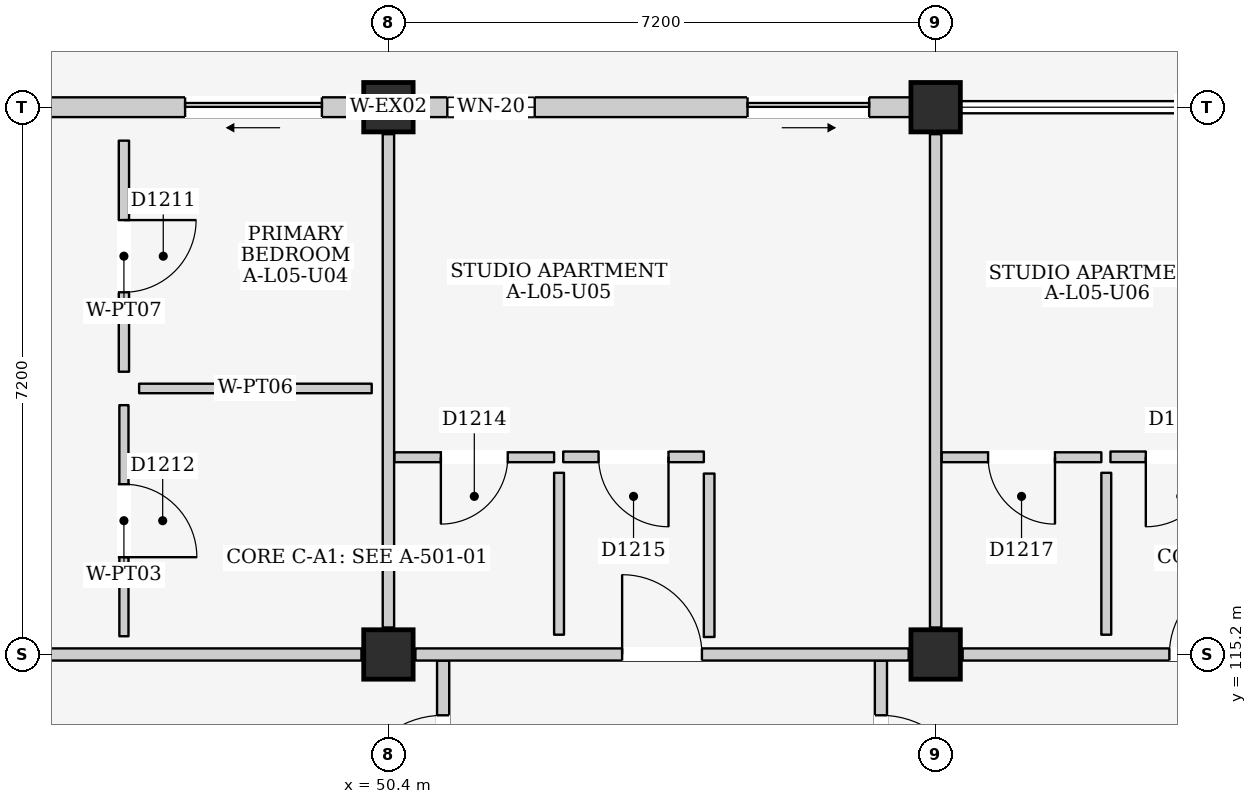
"""IFC4 building model, lengths in metres.
Left out: names, types, materials, properties, quantities, classifications, styles, units other than length and angle.
Written with IfcOpenShell. Run it as: python <this file> out.ifc"""

import sys

from ifc_helpers import new_model, si_unit, direction, frame, frame_2d, origin, origin_2d, place, context, subcontext, project, spatial, rectangle, extrude, element, fill, save


model = new_model("IFC4")
c1 = context("Model", 3, precision=1e-05, world=origin(), true_north=direction((0.0, 1.0)))
c2 = subcontext(c1, "Body", "Model", "MODEL_VIEW")
j1 = project(units=[si_unit("LENGTHUNIT", "METRE"), si_unit("PLANEANGLEUNIT", "RADIAN")], contexts=[c1])
p1 = place(None, origin())
s1 = spatial("IfcSite", under=j1, at=p1, CompositionType="ELEMENT")
p2 = place(p1, origin())
s2 = spatial("IfcBuilding", under=s1, at=p2, CompositionType="ELEMENT")
p3 = place(p2, frame((0.0, 0.0, 18.6)))
s3 = spatial("IfcBuildingStorey", under=s2, at=p3, CompositionType="ELEMENT", Elevation=18.6)
for number, where, z_axis, x_axis in (
    (1, (50.4, 115.2, 0.0), (0.0, 0.0, 1.0), (1.0, 0.0, 0.0)),
    (2, (50.4, 122.4, 0.0), (0.0, 0.0, 1.0), (1.0, 0.0, 0.0)),
    (3, (57.6, 115.2, 0.0), (0.0, 0.0, 1.0), (1.0, 0.0, 0.0)),
    (4, (57.6, 122.4, 0.0), (0.0, 0.0, 1.0), (1.0, 0.0, 0.0)),
):
    element("IfcColumn", number, at=place(p3, frame(where, z_axis=z_axis, x_axis=x_axis)), inside=s3, PredefinedType="COLUMN", context=c2, shape_type="SweptSolid", body=[
        extrude(rectangle(XDim=0.65, YDim=0.65, at=origin_2d()), origin(), (0.0, 0.0, 1.0), 3.3),
    ])
p4 = place(p3, frame((43.525, 122.4, 0.0), z_axis=(0.0, 0.0, 1.0), x_axis=(1.0, 0.0, 0.0)))
e5 = element("IfcWall", 5, at=p4, inside=s3, PredefinedType="ELEMENTEDWALL", context=c2, shape_type="SweptSolid", body=[
    extrude(rectangle(XDim=6.55, YDim=0.26, at=frame_2d((3.275, 0.0))), origin(), (0.0, 0.0, 1.0), 2.595),
])
p5 = place(p4, frame((4.2, 0.0, 0.0)))
e6 = element("IfcOpeningElement", 6, at=p5, cuts=e5, PredefinedType="OPENING", context=c2, shape_type="SweptSolid", body=[
    extrude(rectangle(XDim=1.8, YDim=2.12, at=frame_2d((0.9, 1.06))), frame((0.0, 0.145, 0.0), z_axis=(0.0, -1.0, 0.0), x_axis=(1.0, 0.0, 0.0)), (0.0, 0.0, 1.0), 0.29),
])
p6 = place(p4, frame((0.45, 0.0, 0.9)))
e7 = element("IfcOpeningElement", 7, at=p6, cuts=e5, PredefinedType="OPENING", context=c2, shape_type="SweptSolid", body=[
    extrude(rectangle(XDim=1.65, YDim=1.35, at=frame_2d((0.825, 0.675))), frame((0.0, 0.145, 0.0), z_axis=(0.0, -1.0, 0.0), x_axis=(1.0, 0.0, 0.0)), (0.0, 0.0, 1.0), 0.29),
])
p7 = place(p3, frame((50.725, 122.4, 0.0), z_axis=(0.0, 0.0, 1.0), x_axis=(1.0, 0.0, 0.0)))
e8 = element("IfcWall", 8, at=p7, inside=s3, PredefinedType="ELEMENTEDWALL", context=c2, shape_type="SweptSolid", body=[
    extrude(rectangle(XDim=6.55, YDim=0.26, at=frame_2d((3.275, 0.0))), origin(), (0.0, 0.0, 1.0), 2.595),
])
p8 = place(p7, frame((4.4, 0.0, 0.0)))
e9 = element("IfcOpeningElement", 9, at=p8, cuts=e8, PredefinedType="OPENING", context=c2, shape_type="SweptSolid", body=[
    extrude(rectangle(XDim=1.6, YDim=2.12, at=frame_2d((0.8, 1.06))), frame((0.0, 0.145, 0.0), z_axis=(0.0, -1.0, 0.0), x_axis=(1.0, 0.0, 0.0)), (0.0, 0.0, 1.0), 0.29),
])
p9 = place(p7, frame((0.45, 0.0, 0.9)))
e10 = element("IfcOpeningElement", 10, at=p9, cuts=e8, PredefinedType="OPENING", context=c2, shape_type="SweptSolid", body=[
    extrude(rectangle(XDim=1.15, YDim=1.15, at=frame_2d((0.575, 0.575))), frame((0.0, 0.145, 0.0), z_axis=(0.0, -1.0, 0.0), x_axis=(1.0, 0.0, 0.0)), (0.0, 0.0, 1.0), 0.29),
])
p10 = place(p3, frame((51.12, 111.1, 0.0), z_axis=(0.0, 0.0, 1.0), x_axis=(0.0, 1.0, 0.0)))
e11 = element("IfcWall", 11, at=p10, inside=s3, PredefinedType="PARTITIONING", context=c2, shape_type="SweptSolid", body=[
    extrude(rectangle(XDim=4.02, YDim=0.16, at=frame_2d((2.01, 0.0))), origin(), (0.0, 0.0, 1.0), 3.06),
])
p11 = place(p10, frame((2.1, 0.0, 0.0)))
e12 = element("IfcOpeningElement", 12, at=p11, cuts=e11, PredefinedType="OPENING", context=c2, shape_type="SweptSolid", body=[
    extrude(rectangle(XDim=1.2, YDim=2.2, at=frame_2d((0.6, 1.1))), frame((0.0, 0.095, 0.0), z_axis=(0.0, -1.0, 0.0), x_axis=(1.0, 0.0, 0.0)), (0.0, 0.0, 1.0), 0.19),
])
p12 = place(p3, frame((56.88, 111.1, 0.0), z_axis=(0.0, 0.0, 1.0), x_axis=(0.0, 1.0, 0.0)))
e13 = element("IfcWall", 13, at=p12, inside=s3, PredefinedType="PARTITIONING", context=c2, shape_type="SweptSolid", body=[
    extrude(rectangle(XDim=4.02, YDim=0.16, at=frame_2d((2.01, 0.0))), origin(), (0.0, 0.0, 1.0), 3.06),
])
p13 = place(p12, frame((2.1, 0.0, 0.0)))
e14 = element("IfcOpeningElement", 14, at=p13, cuts=e13, PredefinedType="OPENING", context=c2, shape_type="SweptSolid", body=[
    extrude(rectangle(XDim=1.2, YDim=2.2, at=frame_2d((0.6, 1.1))), frame((0.0, 0.095, 0.0), z_axis=(0.0, -1.0, 0.0), x_axis=(1.0, 0.0, 0.0)), (0.0, 0.0, 1.0), 0.19),
])
p14 = place(p3, frame((43.555, 115.2, 0.0), z_axis=(0.0, 0.0, 1.0), x_axis=(1.0, 0.0, 0.0)))
e15 = element("IfcWall", 15, at=p14, inside=s3, PredefinedType="PARTITIONING", context=c2, shape_type="SweptSolid", body=[
    extrude(rectangle(XDim=6.49, YDim=0.16, at=frame_2d((3.245, 0.0))), origin(), (0.0, 0.0, 1.0), 2.395),
])
p15 = place(p3, frame((50.4, 115.555, 0.0), z_axis=(0.0, 0.0, 1.0), x_axis=(0.0, 1.0, 0.0)))
e16 = element("IfcWall", 16, at=p15, inside=s3, PredefinedType="PARTITIONING", context=c2, shape_type="SweptSolid", body=[
    extrude(rectangle(XDim=6.49, YDim=0.15, at=frame_2d((3.245, 0.0))), origin(), (0.0, 0.0, 1.0), 2.545),
])
p16 = place(p3, frame((46.92, 118.92, 0.0), z_axis=(0.0, 0.0, 1.0), x_axis=(0.0, 1.0, 0.0)))
e17 = element("IfcWall", 17, at=p16, inside=s3, PredefinedType="PARTITIONING", context=c2, shape_type="SweptSolid", body=[
    extrude(rectangle(XDim=3.04, YDim=0.135, at=frame_2d((1.52, 0.0))), origin(), (0.0, 0.0, 1.0), 3.06),
])
p17 = place(p16, frame((1.045, 0.0, 0.0)))
e18 = element("IfcOpeningElement", 18, at=p17, cuts=e17, PredefinedType="OPENING", context=c2, shape_type="SweptSolid", body=[
    extrude(rectangle(XDim=0.95, YDim=2.15, at=frame_2d((0.475, 1.075))), frame((0.0, 0.083, 0.0), z_axis=(0.0, -1.0, 0.0), x_axis=(1.0, 0.0, 0.0)), (0.0, 0.0, 1.0), 0.165),
])
p18 = place(p3, frame((47.12, 118.7, 0.0), z_axis=(0.0, 0.0, 1.0), x_axis=(1.0, 0.0, 0.0)))
e19 = element("IfcWall", 19, at=p18, inside=s3, PredefinedType="PARTITIONING", context=c2, shape_type="SweptSolid", body=[
    extrude(rectangle(XDim=3.06, YDim=0.125, at=frame_2d((1.53, 0.0))), origin(), (0.0, 0.0, 1.0), 3.06),
])
p19 = place(p3, frame((46.92, 115.44, 0.0), z_axis=(0.0, 0.0, 1.0), x_axis=(0.0, 1.0, 0.0)))
e20 = element("IfcWall", 20, at=p19, inside=s3, PredefinedType="PARTITIONING", context=c2, shape_type="SweptSolid", body=[
    extrude(rectangle(XDim=3.04, YDim=0.12, at=frame_2d((1.52, 0.0))), origin(), (0.0, 0.0, 1.0), 3.06),
])
p20 = place(p19, frame((1.04, 0.0, 0.0)))
e21 = element("IfcOpeningElement", 21, at=p20, cuts=e20, PredefinedType="OPENING", context=c2, shape_type="SweptSolid", body=[
    extrude(rectangle(XDim=0.96, YDim=2.15, at=frame_2d((0.48, 1.075))), frame((0.0, 0.075, 0.0), z_axis=(0.0, -1.0, 0.0), x_axis=(1.0, 0.0, 0.0)), (0.0, 0.0, 1.0), 0.15),
])
p21 = place(p3, frame((50.755, 115.2, 0.0), z_axis=(0.0, 0.0, 1.0), x_axis=(1.0, 0.0, 0.0)))
e22 = element("IfcWall", 22, at=p21, inside=s3, PredefinedType="PARTITIONING", context=c2, shape_type="SweptSolid", body=[
    extrude(rectangle(XDim=6.49, YDim=0.16, at=frame_2d((3.245, 0.0))), origin(), (0.0, 0.0, 1.0), 2.395),
])
p22 = place(p21, frame((2.72, 0.0, 0.0)))
e23 = element("IfcOpeningElement", 23, at=p22, cuts=e22, PredefinedType="OPENING", context=c2, shape_type="SweptSolid", body=[
    extrude(rectangle(XDim=1.05, YDim=2.15, at=frame_2d((0.525, 1.075))), frame((0.0, 0.095, 0.0), z_axis=(0.0, -1.0, 0.0), x_axis=(1.0, 0.0, 0.0)), (0.0, 0.0, 1.0), 0.19),
])
p23 = place(p3, frame((57.6, 115.555, 0.0), z_axis=(0.0, 0.0, 1.0), x_axis=(0.0, 1.0, 0.0)))
e24 = element("IfcWall", 24, at=p23, inside=s3, PredefinedType="PARTITIONING", context=c2, shape_type="SweptSolid", body=[
    extrude(rectangle(XDim=6.49, YDim=0.15, at=frame_2d((3.245, 0.0))), origin(), (0.0, 0.0, 1.0), 2.545),
])
p24 = place(p3, frame((50.48, 117.795, 0.0), z_axis=(0.0, 0.0, 1.0), x_axis=(1.0, 0.0, 0.0)))
e25 = element("IfcWall", 25, at=p24, inside=s3, PredefinedType="PARTITIONING", context=c2, shape_type="SweptSolid", body=[
    extrude(rectangle(XDim=2.1, YDim=0.13, at=frame_2d((1.05, 0.0))), origin(), (0.0, 0.0, 1.0), 3.06),
])
p25 = place(p24, frame((0.61, 0.0, 0.0)))
e26 = element("IfcOpeningElement", 26, at=p25, cuts=e25, PredefinedType="OPENING", context=c2, shape_type="SweptSolid", body=[
    extrude(rectangle(XDim=0.88, YDim=2.1, at=frame_2d((0.44, 1.05))), frame((0.0, 0.08, 0.0), z_axis=(0.0, -1.0, 0.0), x_axis=(1.0, 0.0, 0.0)), (0.0, 0.0, 1.0), 0.16),
])
p26 = place(p3, frame((52.645, 115.46, 0.0), z_axis=(0.0, 0.0, 1.0), x_axis=(0.0, 1.0, 0.0)))
e27 = element("IfcWall", 27, at=p26, inside=s3, PredefinedType="PARTITIONING", context=c2, shape_type="SweptSolid", body=[
    extrude(rectangle(XDim=2.13, YDim=0.13, at=frame_2d((1.065, 0.0))), origin(), (0.0, 0.0, 1.0), 3.06),
])
p27 = place(p3, frame((52.7, 117.8, 0.0), z_axis=(0.0, 0.0, 1.0), x_axis=(1.0, 0.0, 0.0)))
e28 = element("IfcWall", 28, at=p27, inside=s3, PredefinedType="PARTITIONING", context=c2, shape_type="SweptSolid", body=[
    extrude(rectangle(XDim=1.85, YDim=0.14, at=frame_2d((0.925, 0.0))), origin(), (0.0, 0.0, 1.0), 3.06),
])
p28 = place(p27, frame((0.465, 0.0, 0.0)))
e29 = element("IfcOpeningElement", 29, at=p28, cuts=e28, PredefinedType="OPENING", context=c2, shape_type="SweptSolid", body=[
    extrude(rectangle(XDim=0.92, YDim=2.1, at=frame_2d((0.46, 1.05))), frame((0.0, 0.085, 0.0), z_axis=(0.0, -1.0, 0.0), x_axis=(1.0, 0.0, 0.0)), (0.0, 0.0, 1.0), 0.17),
])
p29 = place(p3, frame((54.62, 115.43, 0.0), z_axis=(0.0, 0.0, 1.0), x_axis=(0.0, 1.0, 0.0)))
e30 = element("IfcWall", 30, at=p29, inside=s3, PredefinedType="PARTITIONING", context=c2, shape_type="SweptSolid", body=[
    extrude(rectangle(XDim=2.15, YDim=0.14, at=frame_2d((1.075, 0.0))), origin(), (0.0, 0.0, 1.0), 3.06),
])
p30 = place(p3, frame((57.955, 115.2, 0.0), z_axis=(0.0, 0.0, 1.0), x_axis=(1.0, 0.0, 0.0)))
e31 = element("IfcWall", 31, at=p30, inside=s3, PredefinedType="PARTITIONING", context=c2, shape_type="SweptSolid", body=[
    extrude(rectangle(XDim=6.49, YDim=0.16, at=frame_2d((3.245, 0.0))), origin(), (0.0, 0.0, 1.0), 2.395),
])
p31 = place(p30, frame((2.72, 0.0, 0.0)))
e32 = element("IfcOpeningElement", 32, at=p31, cuts=e31, PredefinedType="OPENING", context=c2, shape_type="SweptSolid", body=[
    extrude(rectangle(XDim=1.05, YDim=2.15, at=frame_2d((0.525, 1.075))), frame((0.0, 0.095, 0.0), z_axis=(0.0, -1.0, 0.0), x_axis=(1.0, 0.0, 0.0)), (0.0, 0.0, 1.0), 0.19),
])
p32 = place(p3, frame((57.68, 117.795, 0.0), z_axis=(0.0, 0.0, 1.0), x_axis=(1.0, 0.0, 0.0)))
e33 = element("IfcWall", 33, at=p32, inside=s3, PredefinedType="PARTITIONING", context=c2, shape_type="SweptSolid", body=[
    extrude(rectangle(XDim=2.1, YDim=0.13, at=frame_2d((1.05, 0.0))), origin(), (0.0, 0.0, 1.0), 3.06),
])
p33 = place(p32, frame((0.61, 0.0, 0.0)))
e34 = element("IfcOpeningElement", 34, at=p33, cuts=e33, PredefinedType="OPENING", context=c2, shape_type="SweptSolid", body=[
    extrude(rectangle(XDim=0.88, YDim=2.1, at=frame_2d((0.44, 1.05))), frame((0.0, 0.08, 0.0), z_axis=(0.0, -1.0, 0.0), x_axis=(1.0, 0.0, 0.0)), (0.0, 0.0, 1.0), 0.16),
])
p34 = place(p3, frame((59.845, 115.46, 0.0), z_axis=(0.0, 0.0, 1.0), x_axis=(0.0, 1.0, 0.0)))
e35 = element("IfcWall", 35, at=p34, inside=s3, PredefinedType="PARTITIONING", context=c2, shape_type="SweptSolid", body=[
    extrude(rectangle(XDim=2.13, YDim=0.13, at=frame_2d((1.065, 0.0))), origin(), (0.0, 0.0, 1.0), 3.06),
])
p35 = place(p3, frame((59.9, 117.8, 0.0), z_axis=(0.0, 0.0, 1.0), x_axis=(1.0, 0.0, 0.0)))
e36 = element("IfcWall", 36, at=p35, inside=s3, PredefinedType="PARTITIONING", context=c2, shape_type="SweptSolid", body=[
    extrude(rectangle(XDim=1.85, YDim=0.14, at=frame_2d((0.925, 0.0))), origin(), (0.0, 0.0, 1.0), 3.06),
])
p36 = place(p35, frame((0.465, 0.0, 0.0)))
e37 = element("IfcOpeningElement", 37, at=p36, cuts=e36, PredefinedType="OPENING", context=c2, shape_type="SweptSolid", body=[
    extrude(rectangle(XDim=0.92, YDim=2.1, at=frame_2d((0.46, 1.05))), frame((0.0, 0.085, 0.0), z_axis=(0.0, -1.0, 0.0), x_axis=(1.0, 0.0, 0.0)), (0.0, 0.0, 1.0), 0.17),
])
p37 = place(p5, frame((1.8, 0.0, 0.0), z_axis=(0.0, 0.0, 1.0), x_axis=(-1.0, 0.0, 0.0)))
e38 = element("IfcDoor", 38, at=p37, inside=s3, OperationType="SLIDING_TO_LEFT", PredefinedType="DOOR", context=c2, shape_type="SweptSolid", body=[
    extrude(rectangle(XDim=1.8, YDim=2.12, at=frame_2d((0.9, 1.06))), frame((0.0, 0.025, 0.0), z_axis=(0.0, -1.0, 0.0), x_axis=(1.0, 0.0, 0.0)), (0.0, 0.0, 1.0), 0.05),
])
fill(e6, e38)
p38 = place(p8, frame((1.6, 0.0, 0.0), z_axis=(0.0, 0.0, 1.0), x_axis=(-1.0, 0.0, 0.0)))
e39 = element("IfcDoor", 39, at=p38, inside=s3, OperationType="SLIDING_TO_RIGHT", PredefinedType="DOOR", context=c2, shape_type="SweptSolid", body=[
    extrude(rectangle(XDim=1.6, YDim=2.12, at=frame_2d((0.8, 1.06))), frame((0.0, 0.025, 0.0), z_axis=(0.0, -1.0, 0.0), x_axis=(1.0, 0.0, 0.0)), (0.0, 0.0, 1.0), 0.05),
])
fill(e9, e39)
p39 = place(p9, origin())
e40 = element("IfcWindow", 40, at=p39, inside=s3, PartitioningType="SINGLE_PANEL", PredefinedType="WINDOW", context=c2, shape_type="SweptSolid", body=[
    extrude(rectangle(XDim=1.15, YDim=1.15, at=frame_2d((0.575, 0.575))), frame((0.0, 0.03, 0.0), z_axis=(0.0, -1.0, 0.0), x_axis=(1.0, 0.0, 0.0)), (0.0, 0.0, 1.0), 0.06),
])
fill(e10, e40)
p40 = place(p11, origin())
e41 = element("IfcDoor", 41, at=p40, inside=s3, OperationType="SINGLE_SWING_LEFT", PredefinedType="DOOR", context=c2, shape_type="SweptSolid", body=[
    extrude(rectangle(XDim=1.2, YDim=2.2, at=frame_2d((0.6, 1.1))), frame((0.0, 0.025, 0.0), z_axis=(0.0, -1.0, 0.0), x_axis=(1.0, 0.0, 0.0)), (0.0, 0.0, 1.0), 0.05),
])
fill(e12, e41)
p41 = place(p13, frame((1.2, 0.0, 0.0), z_axis=(0.0, 0.0, 1.0), x_axis=(-1.0, 0.0, 0.0)))
e42 = element("IfcDoor", 42, at=p41, inside=s3, OperationType="SINGLE_SWING_RIGHT", PredefinedType="DOOR", context=c2, shape_type="SweptSolid", body=[
    extrude(rectangle(XDim=1.2, YDim=2.2, at=frame_2d((0.6, 1.1))), frame((0.0, 0.025, 0.0), z_axis=(0.0, -1.0, 0.0), x_axis=(1.0, 0.0, 0.0)), (0.0, 0.0, 1.0), 0.05),
])
fill(e14, e42)
p42 = place(p17, frame((0.95, 0.0, 0.0), z_axis=(0.0, 0.0, 1.0), x_axis=(-1.0, 0.0, 0.0)))
e43 = element("IfcDoor", 43, at=p42, inside=s3, OperationType="SINGLE_SWING_LEFT", PredefinedType="DOOR", context=c2, shape_type="SweptSolid", body=[
    extrude(rectangle(XDim=0.95, YDim=2.15, at=frame_2d((0.475, 1.075))), frame((0.0, 0.025, 0.0), z_axis=(0.0, -1.0, 0.0), x_axis=(1.0, 0.0, 0.0)), (0.0, 0.0, 1.0), 0.05),
])
fill(e18, e43)
p43 = place(p20, frame((0.96, 0.0, 0.0), z_axis=(0.0, 0.0, 1.0), x_axis=(-1.0, 0.0, 0.0)))
e44 = element("IfcDoor", 44, at=p43, inside=s3, OperationType="SINGLE_SWING_RIGHT", PredefinedType="DOOR", context=c2, shape_type="SweptSolid", body=[
    extrude(rectangle(XDim=0.96, YDim=2.15, at=frame_2d((0.48, 1.075))), frame((0.0, 0.025, 0.0), z_axis=(0.0, -1.0, 0.0), x_axis=(1.0, 0.0, 0.0)), (0.0, 0.0, 1.0), 0.05),
])
fill(e21, e44)
p44 = place(p22, origin())
e45 = element("IfcDoor", 45, at=p44, inside=s3, OperationType="SINGLE_SWING_LEFT", PredefinedType="DOOR", context=c2, shape_type="SweptSolid", body=[
    extrude(rectangle(XDim=1.05, YDim=2.15, at=frame_2d((0.525, 1.075))), frame((0.0, 0.025, 0.0), z_axis=(0.0, -1.0, 0.0), x_axis=(1.0, 0.0, 0.0)), (0.0, 0.0, 1.0), 0.05),
])
fill(e23, e45)
p45 = place(p25, frame((0.88, 0.0, 0.0), z_axis=(0.0, 0.0, 1.0), x_axis=(-1.0, 0.0, 0.0)))
e46 = element("IfcDoor", 46, at=p45, inside=s3, OperationType="SINGLE_SWING_RIGHT", PredefinedType="DOOR", context=c2, shape_type="SweptSolid", body=[
    extrude(rectangle(XDim=0.88, YDim=2.1, at=frame_2d((0.44, 1.05))), frame((0.0, 0.025, 0.0), z_axis=(0.0, -1.0, 0.0), x_axis=(1.0, 0.0, 0.0)), (0.0, 0.0, 1.0), 0.05),
])
fill(e26, e46)
p46 = place(p28, frame((0.92, 0.0, 0.0), z_axis=(0.0, 0.0, 1.0), x_axis=(-1.0, 0.0, 0.0)))
e47 = element("IfcDoor", 47, at=p46, inside=s3, OperationType="SINGLE_SWING_LEFT", PredefinedType="DOOR", context=c2, shape_type="SweptSolid", body=[
    extrude(rectangle(XDim=0.92, YDim=2.1, at=frame_2d((0.46, 1.05))), frame((0.0, 0.025, 0.0), z_axis=(0.0, -1.0, 0.0), x_axis=(1.0, 0.0, 0.0)), (0.0, 0.0, 1.0), 0.05),
])
fill(e29, e47)
p47 = place(p31, origin())
e48 = element("IfcDoor", 48, at=p47, inside=s3, OperationType="SINGLE_SWING_RIGHT", PredefinedType="DOOR", context=c2, shape_type="SweptSolid", body=[
    extrude(rectangle(XDim=1.05, YDim=2.15, at=frame_2d((0.525, 1.075))), frame((0.0, 0.025, 0.0), z_axis=(0.0, -1.0, 0.0), x_axis=(1.0, 0.0, 0.0)), (0.0, 0.0, 1.0), 0.05),
])
fill(e32, e48)
p48 = place(p33, frame((0.88, 0.0, 0.0), z_axis=(0.0, 0.0, 1.0), x_axis=(-1.0, 0.0, 0.0)))
e49 = element("IfcDoor", 49, at=p48, inside=s3, OperationType="SINGLE_SWING_LEFT", PredefinedType="DOOR", context=c2, shape_type="SweptSolid", body=[
    extrude(rectangle(XDim=0.88, YDim=2.1, at=frame_2d((0.44, 1.05))), frame((0.0, 0.025, 0.0), z_axis=(0.0, -1.0, 0.0), x_axis=(1.0, 0.0, 0.0)), (0.0, 0.0, 1.0), 0.05),
])
fill(e34, e49)
p49 = place(p36, frame((0.92, 0.0, 0.0), z_axis=(0.0, 0.0, 1.0), x_axis=(-1.0, 0.0, 0.0)))
e50 = element("IfcDoor", 50, at=p49, inside=s3, OperationType="SINGLE_SWING_RIGHT", PredefinedType="DOOR", context=c2, shape_type="SweptSolid", body=[
    extrude(rectangle(XDim=0.92, YDim=2.1, at=frame_2d((0.46, 1.05))), frame((0.0, 0.025, 0.0), z_axis=(0.0, -1.0, 0.0), x_axis=(1.0, 0.0, 0.0)), (0.0, 0.0, 1.0), 0.05),
])
fill(e37, e50)
save(model, sys.argv[1])
